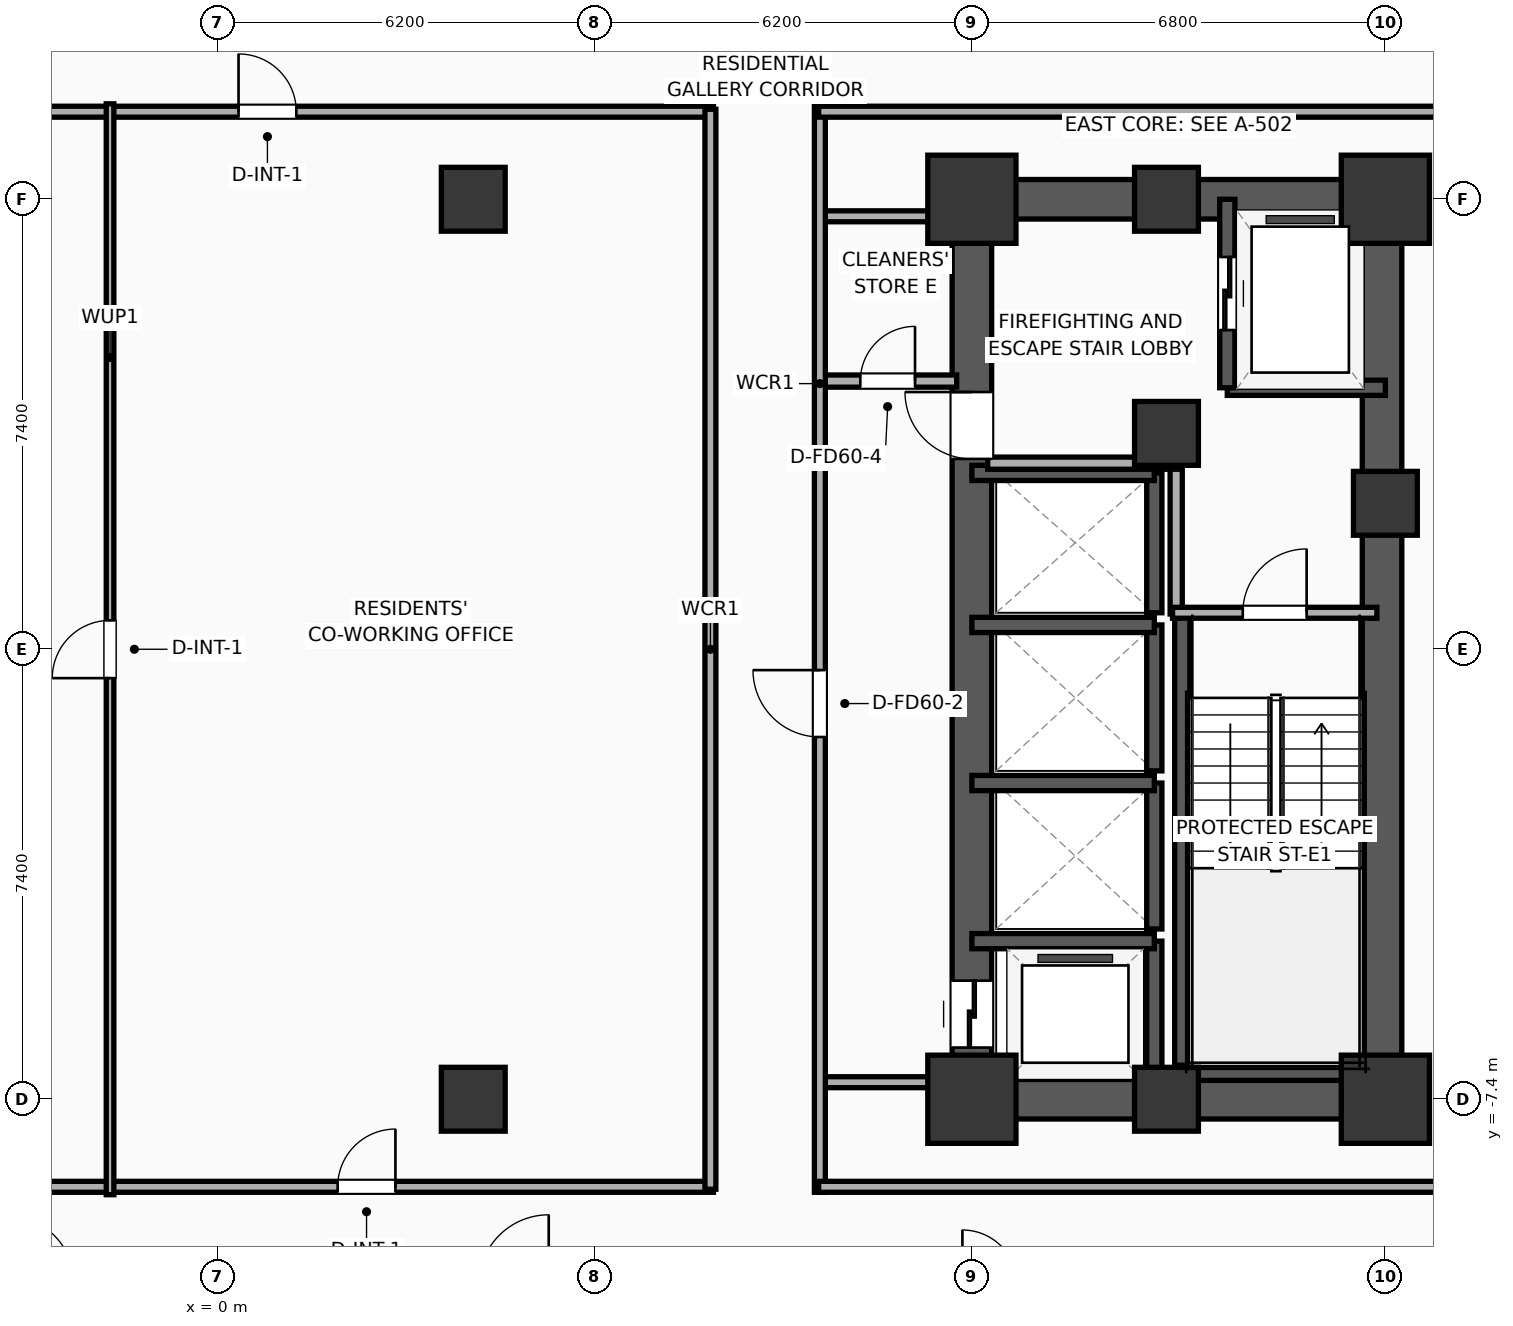
"""IFC4 building model, lengths in metres.
Left out: names, types, materials, properties, quantities, classifications, styles, units other than length and angle.
Written with IfcOpenShell. Run it as: python <this file> out.ifc"""

import sys

from ifc_helpers import new_model, si_unit, direction, frame, frame_2d, origin, origin_2d, place, context, subcontext, project, spatial, rectangle, extrude, element, fill, save


model = new_model("IFC4")
c1 = context("Model", 3, precision=1e-05, world=origin(), true_north=direction((0.0, 1.0)))
c2 = subcontext(c1, "Body", "Model", "MODEL_VIEW")
j1 = project(units=[si_unit("LENGTHUNIT", "METRE"), si_unit("PLANEANGLEUNIT", "RADIAN")], contexts=[c1])
p1 = place(None, origin())
s1 = spatial("IfcSite", under=j1, at=p1, CompositionType="ELEMENT")
p2 = place(p1, origin())
s2 = spatial("IfcBuilding", under=s1, at=p2, CompositionType="ELEMENT")
p3 = place(p2, frame((0.0, 0.0, 26.0)))
s3 = spatial("IfcBuildingStorey", under=s2, at=p3, CompositionType="ELEMENT", Elevation=26.0)
p4 = place(p3, frame((12.4, -7.4, 0.0), z_axis=(0.0, 0.0, 1.0), x_axis=(1.0, 0.0, 0.0)))
e1 = element("IfcColumn", 1, at=p4, inside=s3, PredefinedType="COLUMN", context=c2, shape_type="SweptSolid", body=[
    extrude(rectangle(XDim=1.45, YDim=1.45, at=origin_2d()), origin(), (0.0, 0.0, 1.0), 3.9),
])
p5 = place(p3, frame((15.6, 3.55, 0.0), z_axis=(0.0, 0.0, 1.0), x_axis=(1.0, 0.0, 0.0)))
e2 = element("IfcColumn", 2, at=p5, inside=s3, PredefinedType="COLUMN", context=c2, shape_type="SweptSolid", body=[
    extrude(rectangle(XDim=1.05, YDim=1.05, at=origin_2d()), origin(), (0.0, 0.0, 1.0), 3.9),
])
p6 = place(p3, frame((12.4, 7.4, 0.0), z_axis=(0.0, 0.0, 1.0), x_axis=(1.0, 0.0, 0.0)))
e3 = element("IfcColumn", 3, at=p6, inside=s3, PredefinedType="COLUMN", context=c2, shape_type="SweptSolid", body=[
    extrude(rectangle(XDim=1.45, YDim=1.45, at=origin_2d()), origin(), (0.0, 0.0, 1.0), 3.9),
])
for number, where, z_axis, x_axis in (
    (4, (15.6, -7.4, 0.0), (0.0, 0.0, 1.0), (1.0, 0.0, 0.0)),
    (5, (15.6, 7.4, 0.0), (0.0, 0.0, 1.0), (1.0, 0.0, 0.0)),
):
    element("IfcColumn", number, at=place(p3, frame(where, z_axis=z_axis, x_axis=x_axis)), inside=s3, PredefinedType="COLUMN", context=c2, shape_type="SweptSolid", body=[
        extrude(rectangle(XDim=1.05, YDim=1.05, at=origin_2d()), origin(), (0.0, 0.0, 1.0), 3.9),
    ])
p7 = place(p3, frame((19.2, -7.4, 0.0), z_axis=(0.0, 0.0, 1.0), x_axis=(1.0, 0.0, 0.0)))
e6 = element("IfcColumn", 6, at=p7, inside=s3, PredefinedType="COLUMN", context=c2, shape_type="SweptSolid", body=[
    extrude(rectangle(XDim=1.45, YDim=1.45, at=origin_2d()), origin(), (0.0, 0.0, 1.0), 3.9),
])
p8 = place(p3, frame((19.2, 2.4, 0.0), z_axis=(0.0, 0.0, 1.0), x_axis=(1.0, 0.0, 0.0)))
e7 = element("IfcColumn", 7, at=p8, inside=s3, PredefinedType="COLUMN", context=c2, shape_type="SweptSolid", body=[
    extrude(rectangle(XDim=1.05, YDim=1.05, at=origin_2d()), origin(), (0.0, 0.0, 1.0), 3.9),
])
p9 = place(p3, frame((19.2, 7.4, 0.0), z_axis=(0.0, 0.0, 1.0), x_axis=(1.0, 0.0, 0.0)))
e8 = element("IfcColumn", 8, at=p9, inside=s3, PredefinedType="COLUMN", context=c2, shape_type="SweptSolid", body=[
    extrude(rectangle(XDim=1.45, YDim=1.45, at=origin_2d()), origin(), (0.0, 0.0, 1.0), 3.9),
])
for number, where, z_axis, x_axis in (
    (9, (12.075, -7.4, 0.0), (0.0, 0.0, 1.0), (1.0, 0.0, 0.0)),
    (10, (12.075, 7.4, 0.0), (0.0, 0.0, 1.0), (1.0, 0.0, 0.0)),
):
    element("IfcWall", number, at=place(p3, frame(where, z_axis=z_axis, x_axis=x_axis)), inside=s3, PredefinedType="SHEAR", context=c2, shape_type="SweptSolid", body=[
        extrude(rectangle(XDim=7.45, YDim=0.65, at=frame_2d((3.725, 0.0))), origin(), (0.0, 0.0, 1.0), 3.65),
    ])
p10 = place(p3, frame((12.4, -7.4, 0.0), z_axis=(0.0, 0.0, 1.0), x_axis=(0.0, 1.0, 0.0)))
e11 = element("IfcWall", 11, at=p10, inside=s3, PredefinedType="SHEAR", context=c2, shape_type="SweptSolid", body=[
    extrude(rectangle(XDim=14.8, YDim=0.65, at=frame_2d((7.4, 0.0))), origin(), (0.0, 0.0, 1.0), 3.65),
])
p11 = place(p10, frame((0.85, 0.0, 0.0)))
e12 = element("IfcOpeningElement", 12, at=p11, cuts=e11, PredefinedType="OPENING", context=c2, shape_type="SweptSolid", body=[
    extrude(rectangle(XDim=1.1, YDim=2.05, at=frame_2d((0.55, 1.025))), frame((0.0, 0.335, 0.0), z_axis=(0.0, -1.0, 0.0), x_axis=(1.0, 0.0, 0.0)), (0.0, 0.0, 1.0), 0.67),
])
p12 = place(p10, frame((10.53, 0.0, 0.0)))
e13 = element("IfcOpeningElement", 13, at=p12, cuts=e11, PredefinedType="OPENING", context=c2, shape_type="SweptSolid", body=[
    extrude(rectangle(XDim=1.1, YDim=2.05, at=frame_2d((0.55, 1.025))), frame((0.0, 0.335, 0.0), z_axis=(0.0, -1.0, 0.0), x_axis=(1.0, 0.0, 0.0)), (0.0, 0.0, 1.0), 0.67),
])
p13 = place(p3, frame((19.145, -7.4, 0.0), z_axis=(0.0, 0.0, 1.0), x_axis=(0.0, 1.0, 0.0)))
e14 = element("IfcWall", 14, at=p13, inside=s3, PredefinedType="SHEAR", context=c2, shape_type="SweptSolid", body=[
    extrude(rectangle(XDim=14.8, YDim=0.65, at=frame_2d((7.4, 0.0))), origin(), (0.0, 0.0, 1.0), 3.65),
])
p14 = place(p3, frame((15.86, -7.085, 0.0), z_axis=(0.0, 0.0, 1.0), x_axis=(0.0, 1.0, 0.0)))
e15 = element("IfcWall", 15, at=p14, inside=s3, PredefinedType="SOLIDWALL", context=c2, shape_type="SweptSolid", body=[
    extrude(rectangle(XDim=7.685, YDim=0.25, at=frame_2d((3.843, 0.0))), origin(), (0.0, 0.0, 1.0), 3.65),
])
p15 = place(p3, frame((15.74, -6.965, 0.0), z_axis=(0.0, 0.0, 1.0), x_axis=(1.0, 0.0, 0.0)))
e16 = element("IfcWall", 16, at=p15, inside=s3, PredefinedType="SOLIDWALL", context=c2, shape_type="SweptSolid", body=[
    extrude(rectangle(XDim=3.46, YDim=0.25, at=frame_2d((1.73, 0.0))), origin(), (0.0, 0.0, 1.0), 3.65),
])
for number, where, z_axis, x_axis in (
    (17, (4.2, -7.4, 0.0), (0.0, 0.0, 1.0), (1.0, 0.0, 0.0)),
    (18, (4.2, 7.4, 0.0), (0.0, 0.0, 1.0), (1.0, 0.0, 0.0)),
):
    element("IfcColumn", number, at=place(p3, frame(where, z_axis=z_axis, x_axis=x_axis)), inside=s3, PredefinedType="COLUMN", context=c2, shape_type="SweptSolid", body=[
        extrude(rectangle(XDim=1.05, YDim=1.05, at=origin_2d()), origin(), (0.0, 0.0, 1.0), 3.9),
    ])
p16 = place(p3, frame((16.6, 4.3, 0.0), z_axis=(0.0, 0.0, 1.0), x_axis=(1.0, 0.0, 0.0)))
e19 = element("IfcWall", 19, at=p16, inside=s3, PredefinedType="SOLIDWALL", context=c2, shape_type="SweptSolid", body=[
    extrude(rectangle(XDim=2.6, YDim=0.25, at=frame_2d((1.3, 0.0))), origin(), (0.0, 0.0, 1.0), 3.65),
])
p17 = place(p3, frame((16.6, 7.4, 0.0), z_axis=(0.0, 0.0, 1.0), x_axis=(0.0, -1.0, 0.0)))
e20 = element("IfcWall", 20, at=p17, inside=s3, PredefinedType="SOLIDWALL", context=c2, shape_type="SweptSolid", body=[
    extrude(rectangle(XDim=3.1, YDim=0.25, at=frame_2d((1.55, 0.0))), origin(), (0.0, 0.0, 1.0), 3.65),
])
p18 = place(p17, frame((0.95, 0.0, 0.0)))
e21 = element("IfcOpeningElement", 21, at=p18, cuts=e20, PredefinedType="OPENING", context=c2, shape_type="SweptSolid", body=[
    extrude(rectangle(XDim=1.2, YDim=2.05, at=frame_2d((0.6, 1.025))), frame((0.0, 0.135, 0.0), z_axis=(0.0, -1.0, 0.0), x_axis=(1.0, 0.0, 0.0)), (0.0, 0.0, 1.0), 0.27),
])
p19 = place(p3, frame((15.4, -7.4, 0.0), z_axis=(0.0, 0.0, 1.0), x_axis=(0.0, 1.0, 0.0)))
e22 = element("IfcWall", 22, at=p19, inside=s3, PredefinedType="SOLIDWALL", context=c2, shape_type="SweptSolid", body=[
    extrude(rectangle(XDim=2.6, YDim=0.25, at=frame_2d((1.3, 0.0))), origin(), (0.0, 0.0, 1.0), 3.65),
])
p20 = place(p3, frame((15.4, -4.8, 0.0), z_axis=(0.0, 0.0, 1.0), x_axis=(-1.0, 0.0, 0.0)))
e23 = element("IfcWall", 23, at=p20, inside=s3, PredefinedType="SOLIDWALL", context=c2, shape_type="SweptSolid", body=[
    extrude(rectangle(XDim=3.0, YDim=0.25, at=frame_2d((1.5, 0.0))), origin(), (0.0, 0.0, 1.0), 3.65),
])
p21 = place(p3, frame((15.4, -4.6, 0.0), z_axis=(0.0, 0.0, 1.0), x_axis=(0.0, 1.0, 0.0)))
e24 = element("IfcWall", 24, at=p21, inside=s3, PredefinedType="SOLIDWALL", context=c2, shape_type="SweptSolid", body=[
    extrude(rectangle(XDim=2.4, YDim=0.25, at=frame_2d((1.2, 0.0))), origin(), (0.0, 0.0, 1.0), 3.65),
])
p22 = place(p3, frame((15.4, -2.2, 0.0), z_axis=(0.0, 0.0, 1.0), x_axis=(-1.0, 0.0, 0.0)))
e25 = element("IfcWall", 25, at=p22, inside=s3, PredefinedType="SOLIDWALL", context=c2, shape_type="SweptSolid", body=[
    extrude(rectangle(XDim=3.0, YDim=0.25, at=frame_2d((1.5, 0.0))), origin(), (0.0, 0.0, 1.0), 3.65),
])
p23 = place(p3, frame((15.4, -2.0, 0.0), z_axis=(0.0, 0.0, 1.0), x_axis=(0.0, 1.0, 0.0)))
e26 = element("IfcWall", 26, at=p23, inside=s3, PredefinedType="SOLIDWALL", context=c2, shape_type="SweptSolid", body=[
    extrude(rectangle(XDim=2.4, YDim=0.25, at=frame_2d((1.2, 0.0))), origin(), (0.0, 0.0, 1.0), 3.65),
])
p24 = place(p3, frame((15.4, 0.4, 0.0), z_axis=(0.0, 0.0, 1.0), x_axis=(-1.0, 0.0, 0.0)))
e27 = element("IfcWall", 27, at=p24, inside=s3, PredefinedType="SOLIDWALL", context=c2, shape_type="SweptSolid", body=[
    extrude(rectangle(XDim=3.0, YDim=0.25, at=frame_2d((1.5, 0.0))), origin(), (0.0, 0.0, 1.0), 3.65),
])
p25 = place(p3, frame((15.4, 0.6, 0.0), z_axis=(0.0, 0.0, 1.0), x_axis=(0.0, 1.0, 0.0)))
e28 = element("IfcWall", 28, at=p25, inside=s3, PredefinedType="SOLIDWALL", context=c2, shape_type="SweptSolid", body=[
    extrude(rectangle(XDim=2.3, YDim=0.25, at=frame_2d((1.15, 0.0))), origin(), (0.0, 0.0, 1.0), 3.65),
])
p26 = place(p3, frame((15.4, 2.9, 0.0), z_axis=(0.0, 0.0, 1.0), x_axis=(-1.0, 0.0, 0.0)))
e29 = element("IfcWall", 29, at=p26, inside=s3, PredefinedType="SOLIDWALL", context=c2, shape_type="SweptSolid", body=[
    extrude(rectangle(XDim=3.0, YDim=0.25, at=frame_2d((1.5, 0.0))), origin(), (0.0, 0.0, 1.0), 3.65),
])
p27 = place(p3, frame((15.76, 0.58, 0.0), z_axis=(0.0, 0.0, 1.0), x_axis=(0.0, 1.0, 0.0)))
e30 = element("IfcWall", 30, at=p27, inside=s3, PredefinedType="PARTITIONING", context=c2, shape_type="SweptSolid", body=[
    extrude(rectangle(XDim=2.52, YDim=0.2, at=frame_2d((1.26, 0.0))), origin(), (0.0, 0.0, 1.0), 3.65),
])
p28 = place(p3, frame((12.66, 3.06, 0.0), z_axis=(0.0, 0.0, 1.0), x_axis=(1.0, 0.0, 0.0)))
e31 = element("IfcWall", 31, at=p28, inside=s3, PredefinedType="PARTITIONING", context=c2, shape_type="SweptSolid", body=[
    extrude(rectangle(XDim=3.16, YDim=0.2, at=frame_2d((1.58, 0.0))), origin(), (0.0, 0.0, 1.0), 3.65),
])
p29 = place(p3, frame((15.7, 0.6, 0.0), z_axis=(0.0, 0.0, 1.0), x_axis=(1.0, 0.0, 0.0)))
e32 = element("IfcWall", 32, at=p29, inside=s3, PredefinedType="PARTITIONING", context=c2, shape_type="SweptSolid", body=[
    extrude(rectangle(XDim=3.36, YDim=0.18, at=frame_2d((1.68, 0.0))), origin(), (0.0, 0.0, 1.0), 3.65),
])
p30 = place(p29, frame((1.155, 0.0, 0.0)))
e33 = element("IfcOpeningElement", 33, at=p30, cuts=e32, PredefinedType="OPENING", context=c2, shape_type="SweptSolid", body=[
    extrude(rectangle(XDim=1.05, YDim=2.05, at=frame_2d((0.525, 1.025))), frame((0.0, 0.1, 0.0), z_axis=(0.0, -1.0, 0.0), x_axis=(1.0, 0.0, 0.0)), (0.0, 0.0, 1.0), 0.2),
])
p31 = place(p3, frame((9.88, 4.41, 0.0), z_axis=(0.0, 0.0, 1.0), x_axis=(1.0, 0.0, 0.0)))
e34 = element("IfcWall", 34, at=p31, inside=s3, PredefinedType="PARTITIONING", context=c2, shape_type="SweptSolid", body=[
    extrude(rectangle(XDim=2.27, YDim=0.2, at=frame_2d((1.135, 0.0))), origin(), (0.0, 0.0, 1.0), 3.65),
])
p32 = place(p31, frame((0.685, 0.0, 0.0)))
e35 = element("IfcOpeningElement", 35, at=p32, cuts=e34, PredefinedType="OPENING", context=c2, shape_type="SweptSolid", body=[
    extrude(rectangle(XDim=0.9, YDim=2.05, at=frame_2d((0.45, 1.025))), frame((0.0, 0.11, 0.0), z_axis=(0.0, -1.0, 0.0), x_axis=(1.0, 0.0, 0.0)), (0.0, 0.0, 1.0), 0.22),
])
for number, where, z_axis, x_axis in (
    (36, (9.88, 7.12, 0.0), (0.0, 0.0, 1.0), (1.0, 0.0, 0.0)),
    (37, (9.88, -7.12, 0.0), (0.0, 0.0, 1.0), (1.0, 0.0, 0.0)),
):
    element("IfcWall", number, at=place(p3, frame(where, z_axis=z_axis, x_axis=x_axis)), inside=s3, PredefinedType="PARTITIONING", context=c2, shape_type="SweptSolid", body=[
        extrude(rectangle(XDim=2.27, YDim=0.18, at=frame_2d((1.135, 0.0))), origin(), (0.0, 0.0, 1.0), 2.94),
    ])
p33 = place(p3, frame((9.9, -8.93, 0.0), z_axis=(0.0, 0.0, 1.0), x_axis=(0.0, 1.0, 0.0)))
e38 = element("IfcWall", 38, at=p33, inside=s3, PredefinedType="PARTITIONING", context=c2, shape_type="SweptSolid", body=[
    extrude(rectangle(XDim=17.86, YDim=0.18, at=frame_2d((8.93, 0.0))), origin(), (0.0, 0.0, 1.0), 3.65),
])
p34 = place(p33, frame((7.487, 0.0, 0.0)))
e39 = element("IfcOpeningElement", 39, at=p34, cuts=e38, PredefinedType="OPENING", context=c2, shape_type="SweptSolid", body=[
    extrude(rectangle(XDim=1.1, YDim=2.05, at=frame_2d((0.55, 1.025))), frame((0.0, 0.1, 0.0), z_axis=(0.0, -1.0, 0.0), x_axis=(1.0, 0.0, 0.0)), (0.0, 0.0, 1.0), 0.2),
])
p35 = place(p3, frame((9.88, 8.84, 0.0), z_axis=(0.0, 0.0, 1.0), x_axis=(1.0, 0.0, 0.0)))
e40 = element("IfcWall", 40, at=p35, inside=s3, PredefinedType="PARTITIONING", context=c2, shape_type="SweptSolid", body=[
    extrude(rectangle(XDim=16.33, YDim=0.18, at=frame_2d((8.165, 0.0))), origin(), (0.0, 0.0, 1.0), 3.65),
])
p36 = place(p35, frame((13.99, 0.0, 0.0)))
e41 = element("IfcOpeningElement", 41, at=p36, cuts=e40, PredefinedType="OPENING", context=c2, shape_type="SweptSolid", body=[
    extrude(rectangle(XDim=0.9, YDim=2.05, at=frame_2d((0.45, 1.025))), frame((0.0, 0.1, 0.0), z_axis=(0.0, -1.0, 0.0), x_axis=(1.0, 0.0, 0.0)), (0.0, 0.0, 1.0), 0.2),
])
p37 = place(p3, frame((9.88, -8.84, 0.0), z_axis=(0.0, 0.0, 1.0), x_axis=(1.0, 0.0, 0.0)))
e42 = element("IfcWall", 42, at=p37, inside=s3, PredefinedType="PARTITIONING", context=c2, shape_type="SweptSolid", body=[
    extrude(rectangle(XDim=16.33, YDim=0.18, at=frame_2d((8.165, 0.0))), origin(), (0.0, 0.0, 1.0), 3.65),
])
p38 = place(p3, frame((-8.15, 8.84, 0.0), z_axis=(0.0, 0.0, 1.0), x_axis=(1.0, 0.0, 0.0)))
e43 = element("IfcWall", 43, at=p38, inside=s3, PredefinedType="PARTITIONING", context=c2, shape_type="SweptSolid", body=[
    extrude(rectangle(XDim=16.3, YDim=0.18, at=frame_2d((8.15, 0.0))), origin(), (0.0, 0.0, 1.0), 3.65),
])
p39 = place(p38, frame((8.49, 0.0, 0.0)))
e44 = element("IfcOpeningElement", 44, at=p39, cuts=e43, PredefinedType="OPENING", context=c2, shape_type="SweptSolid", body=[
    extrude(rectangle(XDim=0.95, YDim=2.05, at=frame_2d((0.475, 1.025))), frame((0.0, 0.1, 0.0), z_axis=(0.0, -1.0, 0.0), x_axis=(1.0, 0.0, 0.0)), (0.0, 0.0, 1.0), 0.2),
])
p40 = place(p3, frame((-8.15, -8.84, 0.0), z_axis=(0.0, 0.0, 1.0), x_axis=(1.0, 0.0, 0.0)))
e45 = element("IfcWall", 45, at=p40, inside=s3, PredefinedType="PARTITIONING", context=c2, shape_type="SweptSolid", body=[
    extrude(rectangle(XDim=16.3, YDim=0.18, at=frame_2d((8.15, 0.0))), origin(), (0.0, 0.0, 1.0), 3.65),
])
p41 = place(p40, frame((1.13, 0.0, 0.0)))
e46 = element("IfcOpeningElement", 46, at=p41, cuts=e45, PredefinedType="OPENING", context=c2, shape_type="SweptSolid", body=[
    extrude(rectangle(XDim=1.0, YDim=2.05, at=frame_2d((0.5, 1.025))), frame((0.0, 0.1, 0.0), z_axis=(0.0, -1.0, 0.0), x_axis=(1.0, 0.0, 0.0)), (0.0, 0.0, 1.0), 0.2),
])
p42 = place(p40, frame((10.12, 0.0, 0.0)))
e47 = element("IfcOpeningElement", 47, at=p42, cuts=e45, PredefinedType="OPENING", context=c2, shape_type="SweptSolid", body=[
    extrude(rectangle(XDim=0.95, YDim=2.05, at=frame_2d((0.475, 1.025))), frame((0.0, 0.1, 0.0), z_axis=(0.0, -1.0, 0.0), x_axis=(1.0, 0.0, 0.0)), (0.0, 0.0, 1.0), 0.2),
])
p43 = place(p3, frame((8.1, -8.88, 0.0), z_axis=(0.0, 0.0, 1.0), x_axis=(0.0, 1.0, 0.0)))
e48 = element("IfcWall", 48, at=p43, inside=s3, PredefinedType="PARTITIONING", context=c2, shape_type="SweptSolid", body=[
    extrude(rectangle(XDim=17.76, YDim=0.18, at=frame_2d((8.88, 0.0))), origin(), (0.0, 0.0, 1.0), 3.65),
])
p44 = place(p3, frame((-1.773, -8.97, 0.0), z_axis=(0.0, 0.0, 1.0), x_axis=(0.0, 1.0, 0.0)))
e49 = element("IfcWall", 49, at=p44, inside=s3, PredefinedType="PARTITIONING", context=c2, shape_type="SweptSolid", body=[
    extrude(rectangle(XDim=17.94, YDim=0.125, at=frame_2d((8.97, 0.0))), origin(), (0.0, 0.0, 1.0), 3.65),
])
p45 = place(p44, frame((8.495, 0.0, 0.0)))
e50 = element("IfcOpeningElement", 50, at=p45, cuts=e49, PredefinedType="OPENING", context=c2, shape_type="SweptSolid", body=[
    extrude(rectangle(XDim=0.95, YDim=2.05, at=frame_2d((0.475, 1.025))), frame((0.0, 0.073, 0.0), z_axis=(0.0, -1.0, 0.0), x_axis=(1.0, 0.0, 0.0)), (0.0, 0.0, 1.0), 0.145),
])
p46 = place(p18, origin())
e51 = element("IfcDoor", 51, at=p46, inside=s3, OperationType="SLIDING_TO_LEFT", PredefinedType="DOOR", context=c2, shape_type="SweptSolid", body=[
    extrude(rectangle(XDim=1.2, YDim=2.05, at=frame_2d((0.6, 1.025))), frame((0.0, 0.025, 0.0), z_axis=(0.0, -1.0, 0.0), x_axis=(1.0, 0.0, 0.0)), (0.0, 0.0, 1.0), 0.05),
])
fill(e21, e51)
p47 = place(p11, origin())
e52 = element("IfcDoor", 52, at=p47, inside=s3, OperationType="SLIDING_TO_LEFT", PredefinedType="DOOR", context=c2, shape_type="SweptSolid", body=[
    extrude(rectangle(XDim=1.1, YDim=2.05, at=frame_2d((0.55, 1.025))), frame((0.0, 0.025, 0.0), z_axis=(0.0, -1.0, 0.0), x_axis=(1.0, 0.0, 0.0)), (0.0, 0.0, 1.0), 0.05),
])
fill(e12, e52)
p48 = place(p30, origin())
e53 = element("IfcDoor", 53, at=p48, inside=s3, OperationType="SINGLE_SWING_RIGHT", PredefinedType="DOOR", context=c2, shape_type="SweptSolid", body=[
    extrude(rectangle(XDim=1.05, YDim=2.05, at=frame_2d((0.525, 1.025))), frame((0.0, 0.025, 0.0), z_axis=(0.0, -1.0, 0.0), x_axis=(1.0, 0.0, 0.0)), (0.0, 0.0, 1.0), 0.05),
])
fill(e33, e53)
p49 = place(p32, origin())
e54 = element("IfcDoor", 54, at=p49, inside=s3, OperationType="SINGLE_SWING_RIGHT", PredefinedType="DOOR", context=c2, shape_type="SweptSolid", body=[
    extrude(rectangle(XDim=0.9, YDim=2.05, at=frame_2d((0.45, 1.025))), frame((0.0, 0.025, 0.0), z_axis=(0.0, -1.0, 0.0), x_axis=(1.0, 0.0, 0.0)), (0.0, 0.0, 1.0), 0.05),
])
fill(e35, e54)
p50 = place(p34, origin())
e55 = element("IfcDoor", 55, at=p50, inside=s3, OperationType="SINGLE_SWING_RIGHT", PredefinedType="DOOR", context=c2, shape_type="SweptSolid", body=[
    extrude(rectangle(XDim=1.1, YDim=2.05, at=frame_2d((0.55, 1.025))), frame((0.0, 0.025, 0.0), z_axis=(0.0, -1.0, 0.0), x_axis=(1.0, 0.0, 0.0)), (0.0, 0.0, 1.0), 0.05),
])
fill(e39, e55)
p51 = place(p39, origin())
e56 = element("IfcDoor", 56, at=p51, inside=s3, OperationType="SINGLE_SWING_LEFT", PredefinedType="DOOR", context=c2, shape_type="SweptSolid", body=[
    extrude(rectangle(XDim=0.95, YDim=2.05, at=frame_2d((0.475, 1.025))), frame((0.0, 0.025, 0.0), z_axis=(0.0, -1.0, 0.0), x_axis=(1.0, 0.0, 0.0)), (0.0, 0.0, 1.0), 0.05),
])
fill(e44, e56)
p52 = place(p42, origin())
e57 = element("IfcDoor", 57, at=p52, inside=s3, OperationType="SINGLE_SWING_RIGHT", PredefinedType="DOOR", context=c2, shape_type="SweptSolid", body=[
    extrude(rectangle(XDim=0.95, YDim=2.05, at=frame_2d((0.475, 1.025))), frame((0.0, 0.025, 0.0), z_axis=(0.0, -1.0, 0.0), x_axis=(1.0, 0.0, 0.0)), (0.0, 0.0, 1.0), 0.05),
])
fill(e47, e57)
p53 = place(p45, origin())
e58 = element("IfcDoor", 58, at=p53, inside=s3, OperationType="SINGLE_SWING_LEFT", PredefinedType="DOOR", context=c2, shape_type="SweptSolid", body=[
    extrude(rectangle(XDim=0.95, YDim=2.05, at=frame_2d((0.475, 1.025))), frame((0.0, 0.025, 0.0), z_axis=(0.0, -1.0, 0.0), x_axis=(1.0, 0.0, 0.0)), (0.0, 0.0, 1.0), 0.05),
])
fill(e50, e58)
p54 = place(p12, origin())
e59 = element("IfcDoor", 59, at=p54, inside=s3, OperationType="SINGLE_SWING_RIGHT", PredefinedType="DOOR", context=c2, shape_type="SweptSolid", body=[
    extrude(rectangle(XDim=1.1, YDim=2.05, at=frame_2d((0.55, 1.025))), frame((0.0, 0.025, 0.0), z_axis=(0.0, -1.0, 0.0), x_axis=(1.0, 0.0, 0.0)), (0.0, 0.0, 1.0), 0.05),
])
fill(e13, e59)
save(model, sys.argv[1])
